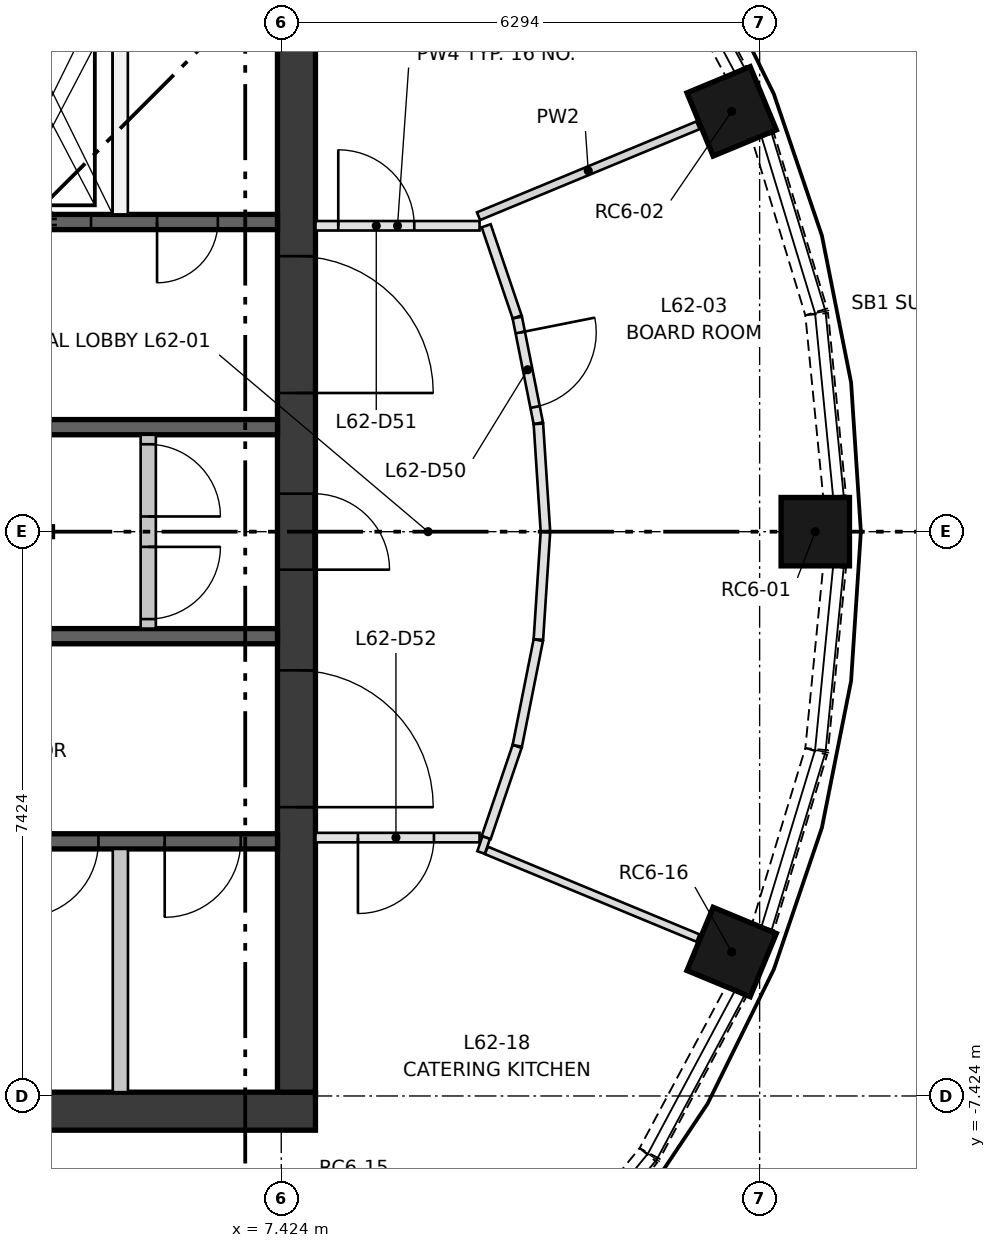
"""IFC4 building model, lengths in metres.
Left out: names, types, materials, properties, quantities, classifications, styles, units other than length and angle.
Written with IfcOpenShell. Run it as: python <this file> out.ifc"""

import sys

from ifc_helpers import new_model, si_unit, direction, frame, frame_2d, origin, origin_2d, place, context, subcontext, project, spatial, rectangle, extrude, element, fill, save


model = new_model("IFC4")
c1 = context("Model", 3, precision=1e-05, world=origin(), true_north=direction((0.0, 1.0)))
c2 = subcontext(c1, "Body", "Model", "MODEL_VIEW")
j1 = project(units=[si_unit("LENGTHUNIT", "METRE"), si_unit("PLANEANGLEUNIT", "RADIAN")], contexts=[c1])
p1 = place(None, origin())
s1 = spatial("IfcSite", under=j1, at=p1, CompositionType="ELEMENT")
p2 = place(p1, origin())
s2 = spatial("IfcBuilding", under=s1, at=p2, CompositionType="ELEMENT")
p3 = place(p2, frame((0.0, 0.0, 227.85)))
s3 = spatial("IfcBuildingStorey", under=s2, at=p3, CompositionType="ELEMENT", Elevation=227.85)
for number, where, z_axis, x_axis in (
    (1, (14.45, 0.0, 0.5), (0.0, 0.0, 1.0), (1.0, 0.0, 0.0)),
    (2, (13.35, 5.53, 0.5), (0.0, 0.0, 1.0), (0.924, 0.383, 0.0)),
    (3, (13.35, -5.53, 0.5), (0.0, 0.0, 1.0), (0.924, -0.383, 0.0)),
):
    element("IfcColumn", number, at=place(p3, frame(where, z_axis=z_axis, x_axis=x_axis)), inside=s3, PredefinedType="COLUMN", context=c2, shape_type="SweptSolid", body=[
        extrude(rectangle(XDim=0.9, YDim=0.9, at=origin_2d()), origin(), (0.0, 0.0, 1.0), 2.35),
    ])
p4 = place(p3, frame((-7.874, -7.624, 0.0), z_axis=(0.0, 0.0, 1.0), x_axis=(1.0, 0.0, 0.0)))
e4 = element("IfcWall", 4, at=p4, inside=s3, PredefinedType="SHEAR", context=c2, shape_type="SweptSolid", body=[
    extrude(rectangle(XDim=15.748, YDim=0.5, at=frame_2d((7.874, 0.0))), origin(), (0.0, 0.0, 1.0), 3.35),
])
p5 = place(p3, frame((7.624, -7.374, 0.0), z_axis=(0.0, 0.0, 1.0), x_axis=(0.0, 1.0, 0.0)))
e5 = element("IfcWall", 5, at=p5, inside=s3, PredefinedType="SHEAR", context=c2, shape_type="SweptSolid", body=[
    extrude(rectangle(XDim=14.748, YDim=0.5, at=frame_2d((7.374, 0.0))), origin(), (0.0, 0.0, 1.0), 3.35),
])
p6 = place(p5, frame((6.874, 0.0, 0.0)))
e6 = element("IfcOpeningElement", 6, at=p6, cuts=e5, PredefinedType="OPENING", context=c2, shape_type="SweptSolid", body=[
    extrude(rectangle(XDim=1.0, YDim=2.1, at=frame_2d((0.5, 1.05))), frame((0.0, 0.26, 0.0), z_axis=(0.0, -1.0, 0.0), x_axis=(1.0, 0.0, 0.0)), (0.0, 0.0, 1.0), 0.52),
])
p7 = place(p5, frame((3.75, 0.0, 0.0)))
e7 = element("IfcOpeningElement", 7, at=p7, cuts=e5, PredefinedType="OPENING", context=c2, shape_type="SweptSolid", body=[
    extrude(rectangle(XDim=1.8, YDim=2.1, at=frame_2d((0.9, 1.05))), frame((0.0, 0.26, 0.0), z_axis=(0.0, -1.0, 0.0), x_axis=(1.0, 0.0, 0.0)), (0.0, 0.0, 1.0), 0.52),
])
p8 = place(p5, frame((9.198, 0.0, 0.0)))
e8 = element("IfcOpeningElement", 8, at=p8, cuts=e5, PredefinedType="OPENING", context=c2, shape_type="SweptSolid", body=[
    extrude(rectangle(XDim=1.8, YDim=2.1, at=frame_2d((0.9, 1.05))), frame((0.0, 0.26, 0.0), z_axis=(0.0, -1.0, 0.0), x_axis=(1.0, 0.0, 0.0)), (0.0, 0.0, 1.0), 0.52),
])
p9 = place(p3, frame((-7.374, -4.074, 0.0), z_axis=(0.0, 0.0, 1.0), x_axis=(1.0, 0.0, 0.0)))
e9 = element("IfcWall", 9, at=p9, inside=s3, PredefinedType="SHEAR", context=c2, shape_type="SweptSolid", body=[
    extrude(rectangle(XDim=14.748, YDim=0.2, at=frame_2d((7.374, 0.0))), origin(), (0.0, 0.0, 1.0), 3.0),
])
p10 = place(p9, frame((1.319, 0.0, 0.0)))
e10 = element("IfcOpeningElement", 10, at=p10, cuts=e9, PredefinedType="OPENING", context=c2, shape_type="SweptSolid", body=[
    extrude(rectangle(XDim=1.1, YDim=2.1, at=frame_2d((0.55, 1.05))), frame((0.0, 0.11, 0.0), z_axis=(0.0, -1.0, 0.0), x_axis=(1.0, 0.0, 0.0)), (0.0, 0.0, 1.0), 0.22),
])
p11 = place(p9, frame((4.456, 0.0, 0.0)))
e11 = element("IfcOpeningElement", 11, at=p11, cuts=e9, PredefinedType="OPENING", context=c2, shape_type="SweptSolid", body=[
    extrude(rectangle(XDim=1.1, YDim=2.1, at=frame_2d((0.55, 1.05))), frame((0.0, 0.11, 0.0), z_axis=(0.0, -1.0, 0.0), x_axis=(1.0, 0.0, 0.0)), (0.0, 0.0, 1.0), 0.22),
])
p12 = place(p9, frame((7.159, 0.0, 0.0)))
e12 = element("IfcOpeningElement", 12, at=p12, cuts=e9, PredefinedType="OPENING", context=c2, shape_type="SweptSolid", body=[
    extrude(rectangle(XDim=0.8, YDim=2.1, at=frame_2d((0.4, 1.05))), frame((0.0, 0.11, 0.0), z_axis=(0.0, -1.0, 0.0), x_axis=(1.0, 0.0, 0.0)), (0.0, 0.0, 1.0), 0.22),
])
p13 = place(p9, frame((9.324, 0.0, 0.0)))
e13 = element("IfcOpeningElement", 13, at=p13, cuts=e9, PredefinedType="OPENING", context=c2, shape_type="SweptSolid", body=[
    extrude(rectangle(XDim=1.0, YDim=2.1, at=frame_2d((0.5, 1.05))), frame((0.0, 0.11, 0.0), z_axis=(0.0, -1.0, 0.0), x_axis=(1.0, 0.0, 0.0)), (0.0, 0.0, 1.0), 0.22),
])
p14 = place(p9, frame((11.393, 0.0, 0.0)))
e14 = element("IfcOpeningElement", 14, at=p14, cuts=e9, PredefinedType="OPENING", context=c2, shape_type="SweptSolid", body=[
    extrude(rectangle(XDim=1.0, YDim=2.1, at=frame_2d((0.5, 1.05))), frame((0.0, 0.11, 0.0), z_axis=(0.0, -1.0, 0.0), x_axis=(1.0, 0.0, 0.0)), (0.0, 0.0, 1.0), 0.22),
])
p15 = place(p9, frame((13.265, 0.0, 0.0)))
e15 = element("IfcOpeningElement", 15, at=p15, cuts=e9, PredefinedType="OPENING", context=c2, shape_type="SweptSolid", body=[
    extrude(rectangle(XDim=1.0, YDim=2.1, at=frame_2d((0.5, 1.05))), frame((0.0, 0.11, 0.0), z_axis=(0.0, -1.0, 0.0), x_axis=(1.0, 0.0, 0.0)), (0.0, 0.0, 1.0), 0.22),
])
p16 = place(p3, frame((0.0, 4.074, 0.0), z_axis=(0.0, 0.0, 1.0), x_axis=(1.0, 0.0, 0.0)))
e16 = element("IfcWall", 16, at=p16, inside=s3, PredefinedType="SHEAR", context=c2, shape_type="SweptSolid", body=[
    extrude(rectangle(XDim=7.374, YDim=0.2, at=frame_2d((3.687, 0.0))), origin(), (0.0, 0.0, 1.0), 3.0),
])
p17 = place(p16, frame((0.384, 0.0, 0.0)))
e17 = element("IfcOpeningElement", 17, at=p17, cuts=e16, PredefinedType="OPENING", context=c2, shape_type="SweptSolid", body=[
    extrude(rectangle(XDim=1.0, YDim=2.1, at=frame_2d((0.5, 1.05))), frame((0.0, 0.11, 0.0), z_axis=(0.0, -1.0, 0.0), x_axis=(1.0, 0.0, 0.0)), (0.0, 0.0, 1.0), 0.22),
])
p18 = place(p16, frame((2.153, 0.0, 0.0)))
e18 = element("IfcOpeningElement", 18, at=p18, cuts=e16, PredefinedType="OPENING", context=c2, shape_type="SweptSolid", body=[
    extrude(rectangle(XDim=1.0, YDim=2.1, at=frame_2d((0.5, 1.05))), frame((0.0, 0.11, 0.0), z_axis=(0.0, -1.0, 0.0), x_axis=(1.0, 0.0, 0.0)), (0.0, 0.0, 1.0), 0.22),
])
p19 = place(p16, frame((3.921, 0.0, 0.0)))
e19 = element("IfcOpeningElement", 19, at=p19, cuts=e16, PredefinedType="OPENING", context=c2, shape_type="SweptSolid", body=[
    extrude(rectangle(XDim=1.0, YDim=2.1, at=frame_2d((0.5, 1.05))), frame((0.0, 0.11, 0.0), z_axis=(0.0, -1.0, 0.0), x_axis=(1.0, 0.0, 0.0)), (0.0, 0.0, 1.0), 0.22),
])
p20 = place(p16, frame((5.79, 0.0, 0.0)))
e20 = element("IfcOpeningElement", 20, at=p20, cuts=e16, PredefinedType="OPENING", context=c2, shape_type="SweptSolid", body=[
    extrude(rectangle(XDim=0.8, YDim=2.1, at=frame_2d((0.4, 1.05))), frame((0.0, 0.11, 0.0), z_axis=(0.0, -1.0, 0.0), x_axis=(1.0, 0.0, 0.0)), (0.0, 0.0, 1.0), 0.22),
])
for number, where, z_axis, x_axis in (
    (21, (4.374, -1.375, 0.0), (0.0, 0.0, 1.0), (1.0, 0.0, 0.0)),
    (22, (4.374, 1.375, 0.0), (0.0, 0.0, 1.0), (1.0, 0.0, 0.0)),
):
    element("IfcWall", number, at=place(p3, frame(where, z_axis=z_axis, x_axis=x_axis)), inside=s3, PredefinedType="SHEAR", context=c2, shape_type="SweptSolid", body=[
        extrude(rectangle(XDim=3.0, YDim=0.2, at=frame_2d((1.5, 0.0))), origin(), (0.0, 0.0, 1.0), 3.0),
    ])
for number, where, z_axis, x_axis in (
    (23, (5.307, -7.374, 0.0), (0.0, 0.0, 1.0), (0.0, 1.0, 0.0)),
    (24, (5.305, 4.174, 0.0), (0.0, 0.0, 1.0), (0.0, 1.0, 0.0)),
):
    element("IfcWall", number, at=place(p3, frame(where, z_axis=z_axis, x_axis=x_axis)), inside=s3, PredefinedType="PARTITIONING", context=c2, shape_type="SweptSolid", body=[
        extrude(rectangle(XDim=3.2, YDim=0.2, at=frame_2d((1.6, 0.0))), origin(), (0.0, 0.0, 1.0), 3.0),
    ])
p21 = place(p3, frame((5.674, -1.275, 0.0), z_axis=(0.0, 0.0, 1.0), x_axis=(0.0, 1.0, 0.0)))
e25 = element("IfcWall", 25, at=p21, inside=s3, PredefinedType="PARTITIONING", context=c2, shape_type="SweptSolid", body=[
    extrude(rectangle(XDim=2.55, YDim=0.2, at=frame_2d((1.275, 0.0))), origin(), (0.0, 0.0, 1.0), 3.0),
])
p22 = place(p21, frame((0.125, 0.0, 0.0)))
e26 = element("IfcOpeningElement", 26, at=p22, cuts=e25, PredefinedType="OPENING", context=c2, shape_type="SweptSolid", body=[
    extrude(rectangle(XDim=0.95, YDim=2.1, at=frame_2d((0.475, 1.05))), frame((0.0, 0.11, 0.0), z_axis=(0.0, -1.0, 0.0), x_axis=(1.0, 0.0, 0.0)), (0.0, 0.0, 1.0), 0.22),
])
p23 = place(p21, frame((1.475, 0.0, 0.0)))
e27 = element("IfcOpeningElement", 27, at=p23, cuts=e25, PredefinedType="OPENING", context=c2, shape_type="SweptSolid", body=[
    extrude(rectangle(XDim=0.95, YDim=2.1, at=frame_2d((0.475, 1.05))), frame((0.0, 0.11, 0.0), z_axis=(0.0, -1.0, 0.0), x_axis=(1.0, 0.0, 0.0)), (0.0, 0.0, 1.0), 0.22),
])
p24 = place(p3, frame((14.705, 0.463, 0.0), z_axis=(0.0, 0.0, 1.0), x_axis=(-0.09792937678, 0.99519336672, 0.0)))
e28 = element("IfcWall", 28, at=p24, inside=s3, PredefinedType="SOLIDWALL", context=c2, shape_type="SweptSolid", body=[
    extrude(rectangle(XDim=2.411, YDim=0.3, at=frame_2d((1.205, 0.0))), origin(), (0.0, 0.0, 1.0), 0.9),
])
p25 = place(p3, frame((14.463, 2.891, 0.0), z_axis=(0.0, 0.0, 1.0), x_axis=(-0.290412066449, 0.956901683383, 0.0)))
e29 = element("IfcWall", 29, at=p25, inside=s3, PredefinedType="SOLIDWALL", context=c2, shape_type="SweptSolid", body=[
    extrude(rectangle(XDim=2.411, YDim=0.3, at=frame_2d((1.206, 0.0))), origin(), (0.0, 0.0, 1.0), 0.9),
])
p26 = place(p3, frame((13.407, 6.055, 0.0), z_axis=(0.0, 0.0, 1.0), x_axis=(-0.471318859495, 0.881962886229, 0.0)))
e30 = element("IfcWall", 30, at=p26, inside=s3, PredefinedType="SOLIDWALL", context=c2, shape_type="SweptSolid", body=[
    extrude(rectangle(XDim=2.41, YDim=0.3, at=frame_2d((1.205, 0.0))), origin(), (0.0, 0.0, 1.0), 0.9),
])
p27 = place(p3, frame((10.726, -10.07, 0.0), z_axis=(0.0, 0.0, 1.0), x_axis=(0.634009359187, 0.773325372959, 0.0)))
e31 = element("IfcWall", 31, at=p27, inside=s3, PredefinedType="SOLIDWALL", context=c2, shape_type="SweptSolid", body=[
    extrude(rectangle(XDim=2.411, YDim=0.3, at=frame_2d((1.206, 0.0))), origin(), (0.0, 0.0, 1.0), 0.9),
])
p28 = place(p3, frame((12.271, -8.181, 0.0), z_axis=(0.0, 0.0, 1.0), x_axis=(0.471318859495, 0.881962886229, 0.0)))
e32 = element("IfcWall", 32, at=p28, inside=s3, PredefinedType="SOLIDWALL", context=c2, shape_type="SweptSolid", body=[
    extrude(rectangle(XDim=2.41, YDim=0.3, at=frame_2d((1.205, 0.0))), origin(), (0.0, 0.0, 1.0), 0.9),
])
p29 = place(p3, frame((13.762, -5.198, 0.0), z_axis=(0.0, 0.0, 1.0), x_axis=(0.290412066449, 0.956901683383, 0.0)))
e33 = element("IfcWall", 33, at=p29, inside=s3, PredefinedType="SOLIDWALL", context=c2, shape_type="SweptSolid", body=[
    extrude(rectangle(XDim=2.411, YDim=0.3, at=frame_2d((1.206, 0.0))), origin(), (0.0, 0.0, 1.0), 0.9),
])
p30 = place(p3, frame((14.469, -2.862, 0.0), z_axis=(0.0, 0.0, 1.0), x_axis=(0.09792937678, 0.99519336672, 0.0)))
e34 = element("IfcWall", 34, at=p30, inside=s3, PredefinedType="SOLIDWALL", context=c2, shape_type="SweptSolid", body=[
    extrude(rectangle(XDim=2.411, YDim=0.3, at=frame_2d((1.205, 0.0))), origin(), (0.0, 0.0, 1.0), 0.9),
])
for number, where, z_axis, x_axis in (
    (35, (10.12, 4.024, 0.0), (0.0, 0.0, 1.0), (0.321, -0.947, 0.0)),
    (36, (10.527, -2.825, 0.0), (0.0, 0.0, 1.0), (-0.321, -0.947, 0.0)),
):
    element("IfcWall", number, at=place(p3, frame(where, z_axis=z_axis, x_axis=x_axis)), inside=s3, PredefinedType="PARTITIONING", context=c2, shape_type="SweptSolid", body=[
        extrude(rectangle(XDim=1.267, YDim=0.125, at=frame_2d((0.633, 0.0))), origin(), (0.0, 0.0, 1.0), 3.0),
    ])
p31 = place(p3, frame((10.529, 2.817, 0.0), z_axis=(0.0, 0.0, 1.0), x_axis=(0.195122471741, -0.980778884878, 0.0)))
e37 = element("IfcWall", 37, at=p31, inside=s3, PredefinedType="PARTITIONING", context=c2, shape_type="SweptSolid", body=[
    extrude(rectangle(XDim=1.418, YDim=0.125, at=frame_2d((0.709, 0.0))), origin(), (0.0, 0.0, 1.0), 3.0),
])
p32 = place(p31, frame((0.2, 0.0, 0.0)))
e38 = element("IfcOpeningElement", 38, at=p32, cuts=e37, PredefinedType="OPENING", context=c2, shape_type="SweptSolid", body=[
    extrude(rectangle(XDim=1.0, YDim=2.1, at=frame_2d((0.5, 1.05))), frame((0.0, 0.073, 0.0), z_axis=(0.0, -1.0, 0.0), x_axis=(1.0, 0.0, 0.0)), (0.0, 0.0, 1.0), 0.145),
])
p33 = place(p3, frame((10.806, -1.427, 0.0), z_axis=(0.0, 0.0, 1.0), x_axis=(-0.195122471741, -0.980778884878, 0.0)))
e39 = element("IfcWall", 39, at=p33, inside=s3, PredefinedType="PARTITIONING", context=c2, shape_type="SweptSolid", body=[
    extrude(rectangle(XDim=1.418, YDim=0.125, at=frame_2d((0.709, 0.0))), origin(), (0.0, 0.0, 1.0), 3.0),
])
for number, where, z_axis, x_axis in (
    (40, (10.807, 1.419, 0.0), (0.0, 0.0, 1.0), (0.065, -0.998, 0.0)),
    (41, (10.9, -0.004, 0.0), (0.0, 0.0, 1.0), (-0.065, -0.998, 0.0)),
):
    element("IfcWall", number, at=place(p3, frame(where, z_axis=z_axis, x_axis=x_axis)), inside=s3, PredefinedType="PARTITIONING", context=c2, shape_type="SweptSolid", body=[
        extrude(rectangle(XDim=1.417, YDim=0.125, at=frame_2d((0.709, 0.0))), origin(), (0.0, 0.0, 1.0), 3.0),
    ])
p34 = place(p3, frame((7.874, 4.024, 0.0), z_axis=(0.0, 0.0, 1.0), x_axis=(1.0, 0.0, 0.0)))
e42 = element("IfcWall", 42, at=p34, inside=s3, PredefinedType="PARTITIONING", context=c2, shape_type="SweptSolid", body=[
    extrude(rectangle(XDim=2.159, YDim=0.125, at=frame_2d((1.08, 0.0))), origin(), (0.0, 0.0, 1.0), 3.0),
])
p35 = place(p34, frame((0.3, 0.0, 0.0)))
e43 = element("IfcOpeningElement", 43, at=p35, cuts=e42, PredefinedType="OPENING", context=c2, shape_type="SweptSolid", body=[
    extrude(rectangle(XDim=1.0, YDim=2.1, at=frame_2d((0.5, 1.05))), frame((0.0, 0.073, 0.0), z_axis=(0.0, -1.0, 0.0), x_axis=(1.0, 0.0, 0.0)), (0.0, 0.0, 1.0), 0.145),
])
p36 = place(p3, frame((10.033, -4.024, 0.0), z_axis=(0.0, 0.0, 1.0), x_axis=(-1.0, 0.0, 0.0)))
e44 = element("IfcWall", 44, at=p36, inside=s3, PredefinedType="PARTITIONING", context=c2, shape_type="SweptSolid", body=[
    extrude(rectangle(XDim=2.159, YDim=0.125, at=frame_2d((1.08, 0.0))), origin(), (0.0, 0.0, 1.0), 3.0),
])
p37 = place(p36, frame((0.6, 0.0, 0.0)))
e45 = element("IfcOpeningElement", 45, at=p37, cuts=e44, PredefinedType="OPENING", context=c2, shape_type="SweptSolid", body=[
    extrude(rectangle(XDim=1.0, YDim=2.1, at=frame_2d((0.5, 1.05))), frame((0.0, 0.073, 0.0), z_axis=(0.0, -1.0, 0.0), x_axis=(1.0, 0.0, 0.0)), (0.0, 0.0, 1.0), 0.145),
])
p38 = place(p3, frame((10.02, 4.15, 0.0), z_axis=(0.0, 0.0, 1.0), x_axis=(0.923853990342, 0.382745090798, 0.0)))
e46 = element("IfcWall", 46, at=p38, inside=s3, PredefinedType="PARTITIONING", context=c2, shape_type="SweptSolid", body=[
    extrude(rectangle(XDim=3.125, YDim=0.11, at=frame_2d((1.562, 0.0))), origin(), (0.0, 0.0, 1.0), 3.0),
])
p39 = place(p3, frame((10.053, -4.221, 0.0), z_axis=(0.0, 0.0, 1.0), x_axis=(0.321164468818, 0.947023433696, 0.0)))
e47 = element("IfcWall", 47, at=p39, inside=s3, PredefinedType="PARTITIONING", context=c2, shape_type="SweptSolid", body=[
    extrude(rectangle(XDim=0.208, YDim=0.105, at=frame_2d((0.104, 0.0))), origin(), (0.0, 0.0, 1.0), 3.0),
])
p40 = place(p3, frame((12.906, -5.346, 0.0), z_axis=(0.0, 0.0, 1.0), x_axis=(-0.923853917674, 0.3827452662, 0.0)))
e48 = element("IfcWall", 48, at=p40, inside=s3, PredefinedType="PARTITIONING", context=c2, shape_type="SweptSolid", body=[
    extrude(rectangle(XDim=3.014, YDim=0.105, at=frame_2d((1.507, 0.0))), origin(), (0.0, 0.0, 1.0), 3.0),
])
p41 = place(p3, frame((4.363, -10.532, 0.0), z_axis=(0.0, 0.0, 1.0), x_axis=(-0.382686527355, 0.923878250519, 0.0)))
e49 = element("IfcWall", 49, at=p41, inside=s3, PredefinedType="PARTITIONING", context=c2, shape_type="SweptSolid", body=[
    extrude(rectangle(XDim=2.877, YDim=0.105, at=frame_2d((1.438, 0.0))), origin(), (0.0, 0.0, 1.0), 3.0),
])
p42 = place(p41, frame((0.9, 0.0, 0.0)))
e50 = element("IfcOpeningElement", 50, at=p42, cuts=e49, PredefinedType="OPENING", context=c2, shape_type="SweptSolid", body=[
    extrude(rectangle(XDim=1.0, YDim=2.1, at=frame_2d((0.5, 1.05))), frame((0.0, 0.062, 0.0), z_axis=(0.0, -1.0, 0.0), x_axis=(1.0, 0.0, 0.0)), (0.0, 0.0, 1.0), 0.125),
])
p43 = place(p19, frame((1.0, 0.0, 0.0), z_axis=(0.0, 0.0, 1.0), x_axis=(-1.0, 0.0, 0.0)))
e51 = element("IfcDoor", 51, at=p43, inside=s3, OperationType="DOUBLE_DOOR_SLIDING", PredefinedType="DOOR", context=c2, shape_type="SweptSolid", body=[
    extrude(rectangle(XDim=1.0, YDim=2.1, at=frame_2d((0.5, 1.05))), frame((0.0, 0.025, 0.0), z_axis=(0.0, -1.0, 0.0), x_axis=(1.0, 0.0, 0.0)), (0.0, 0.0, 1.0), 0.05),
])
fill(e19, e51)
p44 = place(p22, frame((0.95, 0.0, 0.0), z_axis=(0.0, 0.0, 1.0), x_axis=(-1.0, 0.0, 0.0)))
e52 = element("IfcDoor", 52, at=p44, inside=s3, OperationType="SINGLE_SWING_RIGHT", PredefinedType="DOOR", context=c2, shape_type="SweptSolid", body=[
    extrude(rectangle(XDim=0.95, YDim=2.1, at=frame_2d((0.475, 1.05))), frame((0.0, 0.025, 0.0), z_axis=(0.0, -1.0, 0.0), x_axis=(1.0, 0.0, 0.0)), (0.0, 0.0, 1.0), 0.05),
])
fill(e26, e52)
p45 = place(p23, frame((0.95, 0.0, 0.0), z_axis=(0.0, 0.0, 1.0), x_axis=(-1.0, 0.0, 0.0)))
e53 = element("IfcDoor", 53, at=p45, inside=s3, OperationType="SINGLE_SWING_LEFT", PredefinedType="DOOR", context=c2, shape_type="SweptSolid", body=[
    extrude(rectangle(XDim=0.95, YDim=2.1, at=frame_2d((0.475, 1.05))), frame((0.0, 0.025, 0.0), z_axis=(0.0, -1.0, 0.0), x_axis=(1.0, 0.0, 0.0)), (0.0, 0.0, 1.0), 0.05),
])
fill(e27, e53)
p46 = place(p14, frame((1.0, 0.0, 0.0), z_axis=(0.0, 0.0, 1.0), x_axis=(-1.0, 0.0, 0.0)))
e54 = element("IfcDoor", 54, at=p46, inside=s3, OperationType="SINGLE_SWING_LEFT", PredefinedType="DOOR", context=c2, shape_type="SweptSolid", body=[
    extrude(rectangle(XDim=1.0, YDim=2.1, at=frame_2d((0.5, 1.05))), frame((0.0, 0.025, 0.0), z_axis=(0.0, -1.0, 0.0), x_axis=(1.0, 0.0, 0.0)), (0.0, 0.0, 1.0), 0.05),
])
fill(e14, e54)
p47 = place(p15, frame((1.0, 0.0, 0.0), z_axis=(0.0, 0.0, 1.0), x_axis=(-1.0, 0.0, 0.0)))
e55 = element("IfcDoor", 55, at=p47, inside=s3, OperationType="SINGLE_SWING_LEFT", PredefinedType="DOOR", context=c2, shape_type="SweptSolid", body=[
    extrude(rectangle(XDim=1.0, YDim=2.1, at=frame_2d((0.5, 1.05))), frame((0.0, 0.025, 0.0), z_axis=(0.0, -1.0, 0.0), x_axis=(1.0, 0.0, 0.0)), (0.0, 0.0, 1.0), 0.05),
])
fill(e15, e55)
p48 = place(p20, frame((0.8, 0.0, 0.0), z_axis=(0.0, 0.0, 1.0), x_axis=(-1.0, 0.0, 0.0)))
e56 = element("IfcDoor", 56, at=p48, inside=s3, OperationType="SINGLE_SWING_LEFT", PredefinedType="DOOR", context=c2, shape_type="SweptSolid", body=[
    extrude(rectangle(XDim=0.8, YDim=2.1, at=frame_2d((0.4, 1.05))), frame((0.0, 0.025, 0.0), z_axis=(0.0, -1.0, 0.0), x_axis=(1.0, 0.0, 0.0)), (0.0, 0.0, 1.0), 0.05),
])
fill(e20, e56)
p49 = place(p6, frame((1.0, 0.0, 0.0), z_axis=(0.0, 0.0, 1.0), x_axis=(-1.0, 0.0, 0.0)))
e57 = element("IfcDoor", 57, at=p49, inside=s3, OperationType="SINGLE_SWING_LEFT", PredefinedType="DOOR", context=c2, shape_type="SweptSolid", body=[
    extrude(rectangle(XDim=1.0, YDim=2.1, at=frame_2d((0.5, 1.05))), frame((0.0, 0.25, 0.0), z_axis=(0.0, -1.0, 0.0), x_axis=(1.0, 0.0, 0.0)), (0.0, 0.0, 1.0), 0.05),
])
fill(e6, e57)
p50 = place(p7, frame((1.8, 0.0, 0.0), z_axis=(0.0, 0.0, 1.0), x_axis=(-1.0, 0.0, 0.0)))
e58 = element("IfcDoor", 58, at=p50, inside=s3, OperationType="DOUBLE_DOOR_SINGLE_SWING", PredefinedType="DOOR", context=c2, shape_type="SweptSolid", body=[
    extrude(rectangle(XDim=1.8, YDim=2.1, at=frame_2d((0.9, 1.05))), frame((0.0, 0.025, 0.0), z_axis=(0.0, -1.0, 0.0), x_axis=(1.0, 0.0, 0.0)), (0.0, 0.0, 1.0), 0.05),
])
fill(e7, e58)
p51 = place(p8, frame((1.8, 0.0, 0.0), z_axis=(0.0, 0.0, 1.0), x_axis=(-1.0, 0.0, 0.0)))
e59 = element("IfcDoor", 59, at=p51, inside=s3, OperationType="DOUBLE_DOOR_SINGLE_SWING", PredefinedType="DOOR", context=c2, shape_type="SweptSolid", body=[
    extrude(rectangle(XDim=1.8, YDim=2.1, at=frame_2d((0.9, 1.05))), frame((0.0, 0.025, 0.0), z_axis=(0.0, -1.0, 0.0), x_axis=(1.0, 0.0, 0.0)), (0.0, 0.0, 1.0), 0.05),
])
fill(e8, e59)
p52 = place(p32, origin())
e60 = element("IfcDoor", 60, at=p52, inside=s3, OperationType="SINGLE_SWING_LEFT", PredefinedType="DOOR", context=c2, shape_type="SweptSolid", body=[
    extrude(rectangle(XDim=1.0, YDim=2.1, at=frame_2d((0.5, 1.05))), frame((0.0, 0.025, 0.0), z_axis=(0.0, -1.0, 0.0), x_axis=(1.0, 0.0, 0.0)), (0.0, 0.0, 1.0), 0.05),
])
fill(e38, e60)
p53 = place(p35, origin())
e61 = element("IfcDoor", 61, at=p53, inside=s3, OperationType="SINGLE_SWING_LEFT", PredefinedType="DOOR", context=c2, shape_type="SweptSolid", body=[
    extrude(rectangle(XDim=1.0, YDim=2.1, at=frame_2d((0.5, 1.05))), frame((0.0, 0.025, 0.0), z_axis=(0.0, -1.0, 0.0), x_axis=(1.0, 0.0, 0.0)), (0.0, 0.0, 1.0), 0.05),
])
fill(e43, e61)
p54 = place(p37, origin())
e62 = element("IfcDoor", 62, at=p54, inside=s3, OperationType="SINGLE_SWING_RIGHT", PredefinedType="DOOR", context=c2, shape_type="SweptSolid", body=[
    extrude(rectangle(XDim=1.0, YDim=2.1, at=frame_2d((0.5, 1.05))), frame((0.0, 0.025, 0.0), z_axis=(0.0, -1.0, 0.0), x_axis=(1.0, 0.0, 0.0)), (0.0, 0.0, 1.0), 0.05),
])
fill(e45, e62)
save(model, sys.argv[1])
